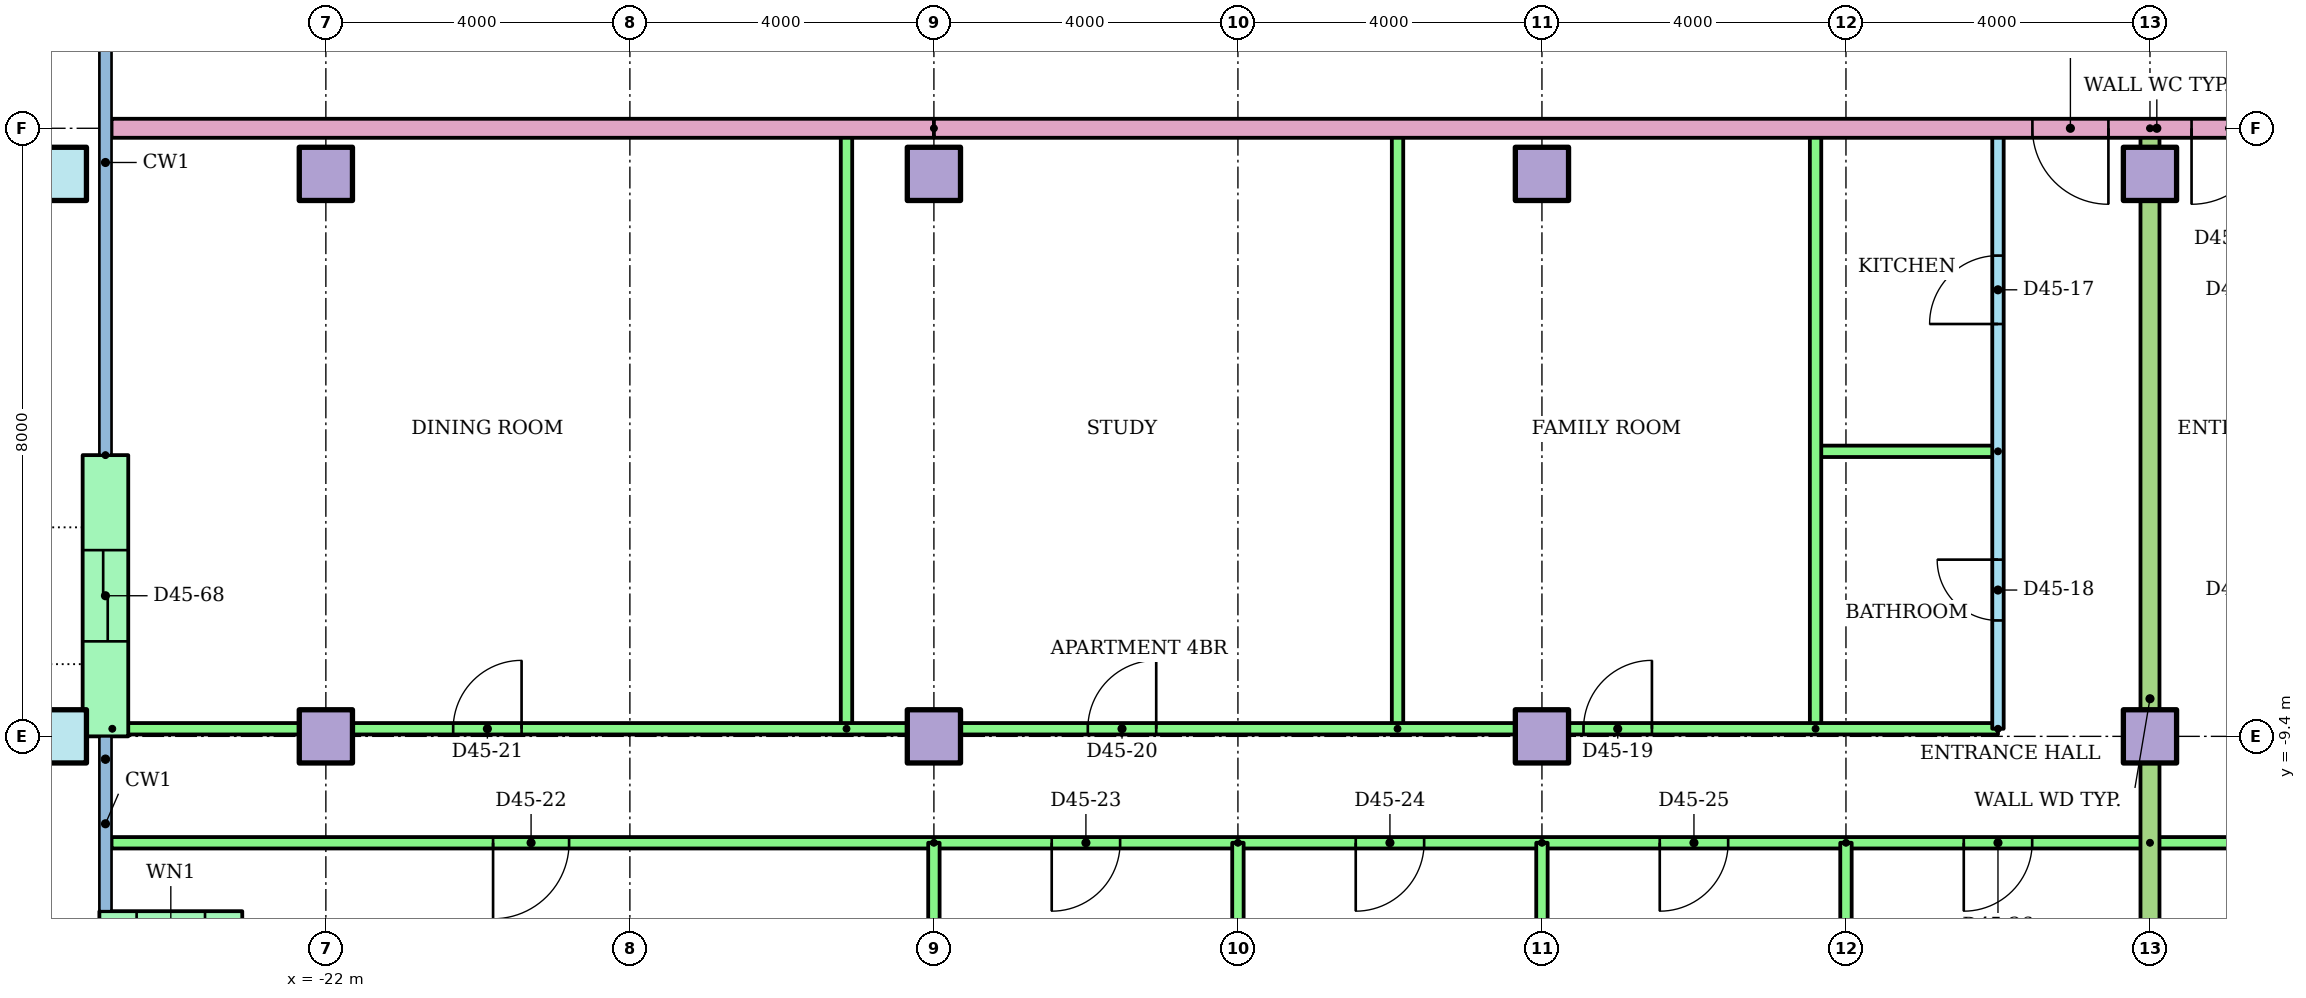
"""IFC4 building model, lengths in metres.
Left out: names, types, materials, properties, quantities, classifications, styles, units other than length and angle.
Written with IfcOpenShell. Run it as: python <this file> out.ifc"""

import sys

from ifc_helpers import new_model, si_unit, direction, frame, frame_2d, origin, origin_2d, place, context, subcontext, project, spatial, rectangle, hollow_rectangle, extrude, element, fill, save


model = new_model("IFC4")
c1 = context("Model", 3, precision=1e-05, world=origin(), true_north=direction((0.0, 1.0)))
c2 = subcontext(c1, "Body", "Model", "MODEL_VIEW")
j1 = project(units=[si_unit("LENGTHUNIT", "METRE"), si_unit("PLANEANGLEUNIT", "RADIAN")], contexts=[c1])
p1 = place(None, origin())
s1 = spatial("IfcSite", under=j1, at=p1, CompositionType="ELEMENT")
p2 = place(p1, origin())
s2 = spatial("IfcBuilding", under=s1, at=p2, CompositionType="ELEMENT")
p3 = place(p2, frame((0.0, 0.0, 174.9)))
s3 = spatial("IfcBuildingStorey", under=s2, at=p3, CompositionType="ELEMENT", Elevation=174.9)
p4 = place(p3, frame((-25.5, -9.4, 0.0)))
e1 = element("IfcColumn", 1, at=p4, inside=s3, PredefinedType="COLUMN", context=c2, shape_type="SweptSolid", body=[
    extrude(hollow_rectangle(XDim=0.7, YDim=0.7, WallThickness=0.036, at=origin_2d()), origin(), (0.0, 0.0, 1.0), 3.2),
])
for number, where in (
    (2, (-22.0, -9.4, 0.0)),
    (3, (-14.0, -9.4, 0.0)),
    (4, (-6.0, -9.4, 0.0)),
    (5, (2.0, -9.4, 0.0)),
):
    element("IfcColumn", number, at=place(p3, frame(where)), inside=s3, PredefinedType="COLUMN", context=c2, shape_type="SweptSolid", body=[
        extrude(rectangle(XDim=0.7, YDim=0.7, at=origin_2d()), origin(), (0.0, 0.0, 1.0), 3.2),
    ])
p5 = place(p3, frame((-25.5, -2.0, 0.0)))
e6 = element("IfcColumn", 6, at=p5, inside=s3, PredefinedType="COLUMN", context=c2, shape_type="SweptSolid", body=[
    extrude(hollow_rectangle(XDim=0.7, YDim=0.7, WallThickness=0.036, at=origin_2d()), origin(), (0.0, 0.0, 1.0), 3.2),
])
for number, where in (
    (7, (-22.0, -2.0, 0.0)),
    (8, (-14.0, -2.0, 0.0)),
    (9, (-6.0, -2.0, 0.0)),
    (10, (2.0, -2.0, 0.0)),
):
    element("IfcColumn", number, at=place(p3, frame(where)), inside=s3, PredefinedType="COLUMN", context=c2, shape_type="SweptSolid", body=[
        extrude(rectangle(XDim=0.7, YDim=0.7, at=origin_2d()), origin(), (0.0, 0.0, 1.0), 3.2),
    ])
p6 = place(p3, frame((-24.9, -5.7, 0.0), z_axis=(0.0, 0.0, 1.0), x_axis=(0.0, -1.0, 0.0)))
e11 = element("IfcWall", 11, at=p6, inside=s3, PredefinedType="STANDARD", context=c2, shape_type="SweptSolid", body=[
    extrude(rectangle(XDim=3.7, YDim=0.6, at=frame_2d((1.85, 0.0))), origin(), (0.0, 0.0, 1.0), 2.92),
])
p7 = place(p6, frame((1.25, 0.0, 0.0)))
e12 = element("IfcOpeningElement", 12, at=p7, cuts=e11, PredefinedType="OPENING", context=c2, shape_type="SweptSolid", body=[
    extrude(rectangle(XDim=1.2, YDim=2.1, at=frame_2d((0.6, 1.05))), frame((0.0, 0.31, 0.0), z_axis=(0.0, -1.0, 0.0), x_axis=(1.0, 0.0, 0.0)), (0.0, 0.0, 1.0), 0.62),
])
p8 = place(p3, frame((-24.98, -12.0, 0.0)))
e13 = element("IfcWall", 13, at=p8, inside=s3, PredefinedType="STANDARD", context=c2, shape_type="SweptSolid", body=[
    extrude(rectangle(XDim=1.88, YDim=0.6, at=frame_2d((0.94, 0.0))), origin(), (0.0, 0.0, 1.0), 2.92),
])
p9 = place(p8, frame((0.49, 0.0, 0.9)))
e14 = element("IfcOpeningElement", 14, at=p9, cuts=e13, PredefinedType="OPENING", context=c2, shape_type="SweptSolid", body=[
    extrude(rectangle(XDim=0.9, YDim=1.5, at=frame_2d((0.45, 0.75))), frame((0.0, 0.31, 0.0), z_axis=(0.0, -1.0, 0.0), x_axis=(1.0, 0.0, 0.0)), (0.0, 0.0, 1.0), 0.62),
])
p10 = place(p3, frame((0.0, -9.3, 0.0), z_axis=(0.0, 0.0, 1.0), x_axis=(0.0, 1.0, 0.0)))
e15 = element("IfcWall", 15, at=p10, inside=s3, PredefinedType="PARTITIONING", context=c2, shape_type="SweptSolid", body=[
    extrude(rectangle(XDim=7.9, YDim=0.15, at=frame_2d((3.95, 0.0))), origin(), (0.0, 0.0, 1.0), 2.4),
])
p11 = place(p10, frame((5.325, 0.0, 0.0)))
e16 = element("IfcOpeningElement", 16, at=p11, cuts=e15, PredefinedType="OPENING", context=c2, shape_type="SweptSolid", body=[
    extrude(rectangle(XDim=0.9, YDim=2.1, at=frame_2d((0.45, 1.05))), frame((0.0, 0.085, 0.0), z_axis=(0.0, -1.0, 0.0), x_axis=(1.0, 0.0, 0.0)), (0.0, 0.0, 1.0), 0.17),
])
p12 = place(p10, frame((1.425, 0.0, 0.0)))
e17 = element("IfcOpeningElement", 17, at=p12, cuts=e15, PredefinedType="OPENING", context=c2, shape_type="SweptSolid", body=[
    extrude(rectangle(XDim=0.8, YDim=2.1, at=frame_2d((0.4, 1.05))), frame((0.0, 0.085, 0.0), z_axis=(0.0, -1.0, 0.0), x_axis=(1.0, 0.0, 0.0)), (0.0, 0.0, 1.0), 0.17),
])
p13 = place(p3, frame((0.0, -5.65, 0.0), z_axis=(0.0, 0.0, 1.0), x_axis=(-1.0, 0.0, 0.0)))
e18 = element("IfcWall", 18, at=p13, inside=s3, PredefinedType="PARTITIONING", context=c2, shape_type="SweptSolid", body=[
    extrude(rectangle(XDim=2.4, YDim=0.15, at=frame_2d((1.2, 0.0))), origin(), (0.0, 0.0, 1.0), 2.4),
])
for number, where, z_axis, x_axis in (
    (19, (-2.4, -9.3, 0.0), (0.0, 0.0, 1.0), (0.0, 1.0, 0.0)),
    (20, (-7.9, -9.3, 0.0), (0.0, 0.0, 1.0), (0.0, 1.0, 0.0)),
    (21, (-15.15, -9.3, 0.0), (0.0, 0.0, 1.0), (0.0, 1.0, 0.0)),
):
    element("IfcWall", number, at=place(p3, frame(where, z_axis=z_axis, x_axis=x_axis)), inside=s3, PredefinedType="PARTITIONING", context=c2, shape_type="SweptSolid", body=[
        extrude(rectangle(XDim=7.9, YDim=0.15, at=frame_2d((3.95, 0.0))), origin(), (0.0, 0.0, 1.0), 2.4),
    ])
p14 = place(p3, frame((-24.81, -9.3, 0.0)))
e22 = element("IfcWall", 22, at=p14, inside=s3, PredefinedType="PARTITIONING", context=c2, shape_type="SweptSolid", body=[
    extrude(rectangle(XDim=24.81, YDim=0.15, at=frame_2d((12.405, 0.0))), origin(), (0.0, 0.0, 1.0), 2.4),
])
p15 = place(p14, frame((19.357, 0.0, 0.0)))
e23 = element("IfcOpeningElement", 23, at=p15, cuts=e22, PredefinedType="OPENING", context=c2, shape_type="SweptSolid", body=[
    extrude(rectangle(XDim=0.9, YDim=2.1, at=frame_2d((0.45, 1.05))), frame((0.0, 0.085, 0.0), z_axis=(0.0, -1.0, 0.0), x_axis=(1.0, 0.0, 0.0)), (0.0, 0.0, 1.0), 0.17),
])
p16 = place(p14, frame((12.835, 0.0, 0.0)))
e24 = element("IfcOpeningElement", 24, at=p16, cuts=e22, PredefinedType="OPENING", context=c2, shape_type="SweptSolid", body=[
    extrude(rectangle(XDim=0.9, YDim=2.1, at=frame_2d((0.45, 1.05))), frame((0.0, 0.085, 0.0), z_axis=(0.0, -1.0, 0.0), x_axis=(1.0, 0.0, 0.0)), (0.0, 0.0, 1.0), 0.17),
])
p17 = place(p14, frame((4.485, 0.0, 0.0)))
e25 = element("IfcOpeningElement", 25, at=p17, cuts=e22, PredefinedType="OPENING", context=c2, shape_type="SweptSolid", body=[
    extrude(rectangle(XDim=0.9, YDim=2.1, at=frame_2d((0.45, 1.05))), frame((0.0, 0.085, 0.0), z_axis=(0.0, -1.0, 0.0), x_axis=(1.0, 0.0, 0.0)), (0.0, 0.0, 1.0), 0.17),
])
p18 = place(p3, frame((2.0, -10.8, 0.0), z_axis=(0.0, 0.0, 1.0), x_axis=(-1.0, 0.0, 0.0)))
e26 = element("IfcWall", 26, at=p18, inside=s3, PredefinedType="PARTITIONING", context=c2, shape_type="SweptSolid", body=[
    extrude(rectangle(XDim=26.82, YDim=0.15, at=frame_2d((13.41, 0.0))), origin(), (0.0, 0.0, 1.0), 2.4),
])
p19 = place(p18, frame((20.8, 0.0, 0.0)))
e27 = element("IfcOpeningElement", 27, at=p19, cuts=e26, PredefinedType="OPENING", context=c2, shape_type="SweptSolid", body=[
    extrude(rectangle(XDim=1.0, YDim=2.1, at=frame_2d((0.5, 1.05))), frame((0.0, 0.085, 0.0), z_axis=(0.0, -1.0, 0.0), x_axis=(1.0, 0.0, 0.0)), (0.0, 0.0, 1.0), 0.17),
])
p20 = place(p18, frame((13.55, 0.0, 0.0)))
e28 = element("IfcOpeningElement", 28, at=p20, cuts=e26, PredefinedType="OPENING", context=c2, shape_type="SweptSolid", body=[
    extrude(rectangle(XDim=0.9, YDim=2.1, at=frame_2d((0.45, 1.05))), frame((0.0, 0.085, 0.0), z_axis=(0.0, -1.0, 0.0), x_axis=(1.0, 0.0, 0.0)), (0.0, 0.0, 1.0), 0.17),
])
p21 = place(p18, frame((9.55, 0.0, 0.0)))
e29 = element("IfcOpeningElement", 29, at=p21, cuts=e26, PredefinedType="OPENING", context=c2, shape_type="SweptSolid", body=[
    extrude(rectangle(XDim=0.9, YDim=2.1, at=frame_2d((0.45, 1.05))), frame((0.0, 0.085, 0.0), z_axis=(0.0, -1.0, 0.0), x_axis=(1.0, 0.0, 0.0)), (0.0, 0.0, 1.0), 0.17),
])
p22 = place(p18, frame((5.55, 0.0, 0.0)))
e30 = element("IfcOpeningElement", 30, at=p22, cuts=e26, PredefinedType="OPENING", context=c2, shape_type="SweptSolid", body=[
    extrude(rectangle(XDim=0.9, YDim=2.1, at=frame_2d((0.45, 1.05))), frame((0.0, 0.085, 0.0), z_axis=(0.0, -1.0, 0.0), x_axis=(1.0, 0.0, 0.0)), (0.0, 0.0, 1.0), 0.17),
])
p23 = place(p18, frame((1.55, 0.0, 0.0)))
e31 = element("IfcOpeningElement", 31, at=p23, cuts=e26, PredefinedType="OPENING", context=c2, shape_type="SweptSolid", body=[
    extrude(rectangle(XDim=0.9, YDim=2.1, at=frame_2d((0.45, 1.05))), frame((0.0, 0.085, 0.0), z_axis=(0.0, -1.0, 0.0), x_axis=(1.0, 0.0, 0.0)), (0.0, 0.0, 1.0), 0.17),
])
p24 = place(p3, frame((-14.0, -10.8, 0.0), z_axis=(0.0, 0.0, 1.0), x_axis=(0.0, -1.0, 0.0)))
e32 = element("IfcWall", 32, at=p24, inside=s3, PredefinedType="PARTITIONING", context=c2, shape_type="SweptSolid", body=[
    extrude(rectangle(XDim=5.61, YDim=0.15, at=frame_2d((2.805, 0.0))), origin(), (0.0, 0.0, 1.0), 2.4),
])
p25 = place(p3, frame((-10.0, -10.8, 0.0), z_axis=(0.0, 0.0, 1.0), x_axis=(0.0, -1.0, 0.0)))
e33 = element("IfcWall", 33, at=p25, inside=s3, PredefinedType="PARTITIONING", context=c2, shape_type="SweptSolid", body=[
    extrude(rectangle(XDim=5.621, YDim=0.15, at=frame_2d((2.811, 0.0))), origin(), (0.0, 0.0, 1.0), 2.4),
])
p26 = place(p3, frame((-6.0, -10.8, 0.0), z_axis=(0.0, 0.0, 1.0), x_axis=(0.0, -1.0, 0.0)))
e34 = element("IfcWall", 34, at=p26, inside=s3, PredefinedType="PARTITIONING", context=c2, shape_type="SweptSolid", body=[
    extrude(rectangle(XDim=5.61, YDim=0.15, at=frame_2d((2.805, 0.0))), origin(), (0.0, 0.0, 1.0), 2.4),
])
p27 = place(p3, frame((-2.0, -10.8, 0.0), z_axis=(0.0, 0.0, 1.0), x_axis=(0.0, -1.0, 0.0)))
e35 = element("IfcWall", 35, at=p27, inside=s3, PredefinedType="PARTITIONING", context=c2, shape_type="SweptSolid", body=[
    extrude(rectangle(XDim=5.621, YDim=0.15, at=frame_2d((2.811, 0.0))), origin(), (0.0, 0.0, 1.0), 2.4),
])
p28 = place(p3, frame((18.0, -10.8, 0.0), z_axis=(0.0, 0.0, 1.0), x_axis=(-1.0, 0.0, 0.0)))
e36 = element("IfcWall", 36, at=p28, inside=s3, PredefinedType="PARTITIONING", context=c2, shape_type="SweptSolid", body=[
    extrude(rectangle(XDim=16.0, YDim=0.15, at=frame_2d((8.0, 0.0))), origin(), (0.0, 0.0, 1.0), 2.4),
])
p29 = place(p28, frame((11.5, 0.0, 0.0)))
e37 = element("IfcOpeningElement", 37, at=p29, cuts=e36, PredefinedType="OPENING", context=c2, shape_type="SweptSolid", body=[
    extrude(rectangle(XDim=1.0, YDim=2.1, at=frame_2d((0.5, 1.05))), frame((0.0, 0.085, 0.0), z_axis=(0.0, -1.0, 0.0), x_axis=(1.0, 0.0, 0.0)), (0.0, 0.0, 1.0), 0.17),
])
p30 = place(p28, frame((5.55, 0.0, 0.0)))
e38 = element("IfcOpeningElement", 38, at=p30, cuts=e36, PredefinedType="OPENING", context=c2, shape_type="SweptSolid", body=[
    extrude(rectangle(XDim=0.9, YDim=2.1, at=frame_2d((0.45, 1.05))), frame((0.0, 0.085, 0.0), z_axis=(0.0, -1.0, 0.0), x_axis=(1.0, 0.0, 0.0)), (0.0, 0.0, 1.0), 0.17),
])
p31 = place(p28, frame((1.55, 0.0, 0.0)))
e39 = element("IfcOpeningElement", 39, at=p31, cuts=e36, PredefinedType="OPENING", context=c2, shape_type="SweptSolid", body=[
    extrude(rectangle(XDim=0.9, YDim=2.1, at=frame_2d((0.45, 1.05))), frame((0.0, 0.085, 0.0), z_axis=(0.0, -1.0, 0.0), x_axis=(1.0, 0.0, 0.0)), (0.0, 0.0, 1.0), 0.17),
])
p32 = place(p3, frame((2.0, -1.4, 0.0), z_axis=(0.0, 0.0, 1.0), x_axis=(0.0, -1.0, 0.0)))
e40 = element("IfcWall", 40, at=p32, inside=s3, PredefinedType="PARTITIONING", context=c2, shape_type="SweptSolid", body=[
    extrude(rectangle(XDim=15.01, YDim=0.25, at=frame_2d((7.505, 0.0))), origin(), (0.0, 0.0, 1.0), 2.4),
])
p33 = place(p3, frame((-14.0, -1.4, 0.0), z_axis=(0.0, 0.0, 1.0), x_axis=(-1.0, 0.0, 0.0)))
e41 = element("IfcWall", 41, at=p33, inside=s3, PredefinedType="PARTITIONING", context=c2, shape_type="SweptSolid", body=[
    extrude(rectangle(XDim=10.82, YDim=0.25, at=frame_2d((5.41, 0.0))), origin(), (0.0, 0.0, 1.0), 2.4),
])
p34 = place(p3, frame((14.0, -1.4, 0.0), z_axis=(0.0, 0.0, 1.0), x_axis=(-1.0, 0.0, 0.0)))
e42 = element("IfcWall", 42, at=p34, inside=s3, PredefinedType="PARTITIONING", context=c2, shape_type="SweptSolid", body=[
    extrude(rectangle(XDim=28.0, YDim=0.25, at=frame_2d((14.0, 0.0))), origin(), (0.0, 0.0, 1.0), 2.4),
])
p35 = place(p34, frame((12.547, 0.0, 0.0)))
e43 = element("IfcOpeningElement", 43, at=p35, cuts=e42, PredefinedType="OPENING", context=c2, shape_type="SweptSolid", body=[
    extrude(rectangle(XDim=1.0, YDim=2.1, at=frame_2d((0.5, 1.05))), frame((0.0, 0.135, 0.0), z_axis=(0.0, -1.0, 0.0), x_axis=(1.0, 0.0, 0.0)), (0.0, 0.0, 1.0), 0.27),
])
p36 = place(p34, frame((10.453, 0.0, 0.0)))
e44 = element("IfcOpeningElement", 44, at=p36, cuts=e42, PredefinedType="OPENING", context=c2, shape_type="SweptSolid", body=[
    extrude(rectangle(XDim=1.0, YDim=2.1, at=frame_2d((0.5, 1.05))), frame((0.0, 0.135, 0.0), z_axis=(0.0, -1.0, 0.0), x_axis=(1.0, 0.0, 0.0)), (0.0, 0.0, 1.0), 0.27),
])
p37 = place(p11, origin())
e45 = element("IfcDoor", 45, at=p37, inside=s3, OperationType="SINGLE_SWING_LEFT", PredefinedType="DOOR", context=c2, shape_type="SweptSolid", body=[
    extrude(rectangle(XDim=0.9, YDim=2.1, at=frame_2d((0.45, 1.05))), frame((0.0, 0.025, 0.0), z_axis=(0.0, -1.0, 0.0), x_axis=(1.0, 0.0, 0.0)), (0.0, 0.0, 1.0), 0.05),
])
fill(e16, e45)
p38 = place(p12, origin())
e46 = element("IfcDoor", 46, at=p38, inside=s3, OperationType="SINGLE_SWING_RIGHT", PredefinedType="DOOR", context=c2, shape_type="SweptSolid", body=[
    extrude(rectangle(XDim=0.8, YDim=2.1, at=frame_2d((0.4, 1.05))), frame((0.0, 0.025, 0.0), z_axis=(0.0, -1.0, 0.0), x_axis=(1.0, 0.0, 0.0)), (0.0, 0.0, 1.0), 0.05),
])
fill(e17, e46)
p39 = place(p15, origin())
e47 = element("IfcDoor", 47, at=p39, inside=s3, OperationType="SINGLE_SWING_RIGHT", PredefinedType="DOOR", context=c2, shape_type="SweptSolid", body=[
    extrude(rectangle(XDim=0.9, YDim=2.1, at=frame_2d((0.45, 1.05))), frame((0.0, 0.025, 0.0), z_axis=(0.0, -1.0, 0.0), x_axis=(1.0, 0.0, 0.0)), (0.0, 0.0, 1.0), 0.05),
])
fill(e23, e47)
p40 = place(p16, origin())
e48 = element("IfcDoor", 48, at=p40, inside=s3, OperationType="SINGLE_SWING_RIGHT", PredefinedType="DOOR", context=c2, shape_type="SweptSolid", body=[
    extrude(rectangle(XDim=0.9, YDim=2.1, at=frame_2d((0.45, 1.05))), frame((0.0, 0.025, 0.0), z_axis=(0.0, -1.0, 0.0), x_axis=(1.0, 0.0, 0.0)), (0.0, 0.0, 1.0), 0.05),
])
fill(e24, e48)
p41 = place(p17, origin())
e49 = element("IfcDoor", 49, at=p41, inside=s3, OperationType="SINGLE_SWING_RIGHT", PredefinedType="DOOR", context=c2, shape_type="SweptSolid", body=[
    extrude(rectangle(XDim=0.9, YDim=2.1, at=frame_2d((0.45, 1.05))), frame((0.0, 0.025, 0.0), z_axis=(0.0, -1.0, 0.0), x_axis=(1.0, 0.0, 0.0)), (0.0, 0.0, 1.0), 0.05),
])
fill(e25, e49)
p42 = place(p19, origin())
e50 = element("IfcDoor", 50, at=p42, inside=s3, OperationType="SINGLE_SWING_RIGHT", PredefinedType="DOOR", context=c2, shape_type="SweptSolid", body=[
    extrude(rectangle(XDim=1.0, YDim=2.1, at=frame_2d((0.5, 1.05))), frame((0.0, 0.025, 0.0), z_axis=(0.0, -1.0, 0.0), x_axis=(1.0, 0.0, 0.0)), (0.0, 0.0, 1.0), 0.05),
])
fill(e27, e50)
p43 = place(p20, origin())
e51 = element("IfcDoor", 51, at=p43, inside=s3, OperationType="SINGLE_SWING_RIGHT", PredefinedType="DOOR", context=c2, shape_type="SweptSolid", body=[
    extrude(rectangle(XDim=0.9, YDim=2.1, at=frame_2d((0.45, 1.05))), frame((0.0, 0.025, 0.0), z_axis=(0.0, -1.0, 0.0), x_axis=(1.0, 0.0, 0.0)), (0.0, 0.0, 1.0), 0.05),
])
fill(e28, e51)
p44 = place(p21, origin())
e52 = element("IfcDoor", 52, at=p44, inside=s3, OperationType="SINGLE_SWING_RIGHT", PredefinedType="DOOR", context=c2, shape_type="SweptSolid", body=[
    extrude(rectangle(XDim=0.9, YDim=2.1, at=frame_2d((0.45, 1.05))), frame((0.0, 0.025, 0.0), z_axis=(0.0, -1.0, 0.0), x_axis=(1.0, 0.0, 0.0)), (0.0, 0.0, 1.0), 0.05),
])
fill(e29, e52)
p45 = place(p22, origin())
e53 = element("IfcDoor", 53, at=p45, inside=s3, OperationType="SINGLE_SWING_RIGHT", PredefinedType="DOOR", context=c2, shape_type="SweptSolid", body=[
    extrude(rectangle(XDim=0.9, YDim=2.1, at=frame_2d((0.45, 1.05))), frame((0.0, 0.025, 0.0), z_axis=(0.0, -1.0, 0.0), x_axis=(1.0, 0.0, 0.0)), (0.0, 0.0, 1.0), 0.05),
])
fill(e30, e53)
p46 = place(p23, origin())
e54 = element("IfcDoor", 54, at=p46, inside=s3, OperationType="SINGLE_SWING_RIGHT", PredefinedType="DOOR", context=c2, shape_type="SweptSolid", body=[
    extrude(rectangle(XDim=0.9, YDim=2.1, at=frame_2d((0.45, 1.05))), frame((0.0, 0.025, 0.0), z_axis=(0.0, -1.0, 0.0), x_axis=(1.0, 0.0, 0.0)), (0.0, 0.0, 1.0), 0.05),
])
fill(e31, e54)
p47 = place(p35, origin())
e55 = element("IfcDoor", 55, at=p47, inside=s3, OperationType="SINGLE_SWING_LEFT", PredefinedType="DOOR", context=c2, shape_type="SweptSolid", body=[
    extrude(rectangle(XDim=1.0, YDim=2.1, at=frame_2d((0.5, 1.05))), frame((0.0, 0.025, 0.0), z_axis=(0.0, -1.0, 0.0), x_axis=(1.0, 0.0, 0.0)), (0.0, 0.0, 1.0), 0.05),
])
fill(e43, e55)
p48 = place(p36, origin())
e56 = element("IfcDoor", 56, at=p48, inside=s3, OperationType="SINGLE_SWING_RIGHT", PredefinedType="DOOR", context=c2, shape_type="SweptSolid", body=[
    extrude(rectangle(XDim=1.0, YDim=2.1, at=frame_2d((0.5, 1.05))), frame((0.0, 0.025, 0.0), z_axis=(0.0, -1.0, 0.0), x_axis=(1.0, 0.0, 0.0)), (0.0, 0.0, 1.0), 0.05),
])
fill(e44, e56)
p49 = place(p7, origin())
e57 = element("IfcDoor", 57, at=p49, inside=s3, OperationType="SLIDING_TO_LEFT", PredefinedType="DOOR", context=c2, shape_type="SweptSolid", body=[
    extrude(rectangle(XDim=1.2, YDim=2.1, at=frame_2d((0.6, 1.05))), frame((0.0, 0.025, 0.0), z_axis=(0.0, -1.0, 0.0), x_axis=(1.0, 0.0, 0.0)), (0.0, 0.0, 1.0), 0.05),
])
fill(e12, e57)
save(model, sys.argv[1])
